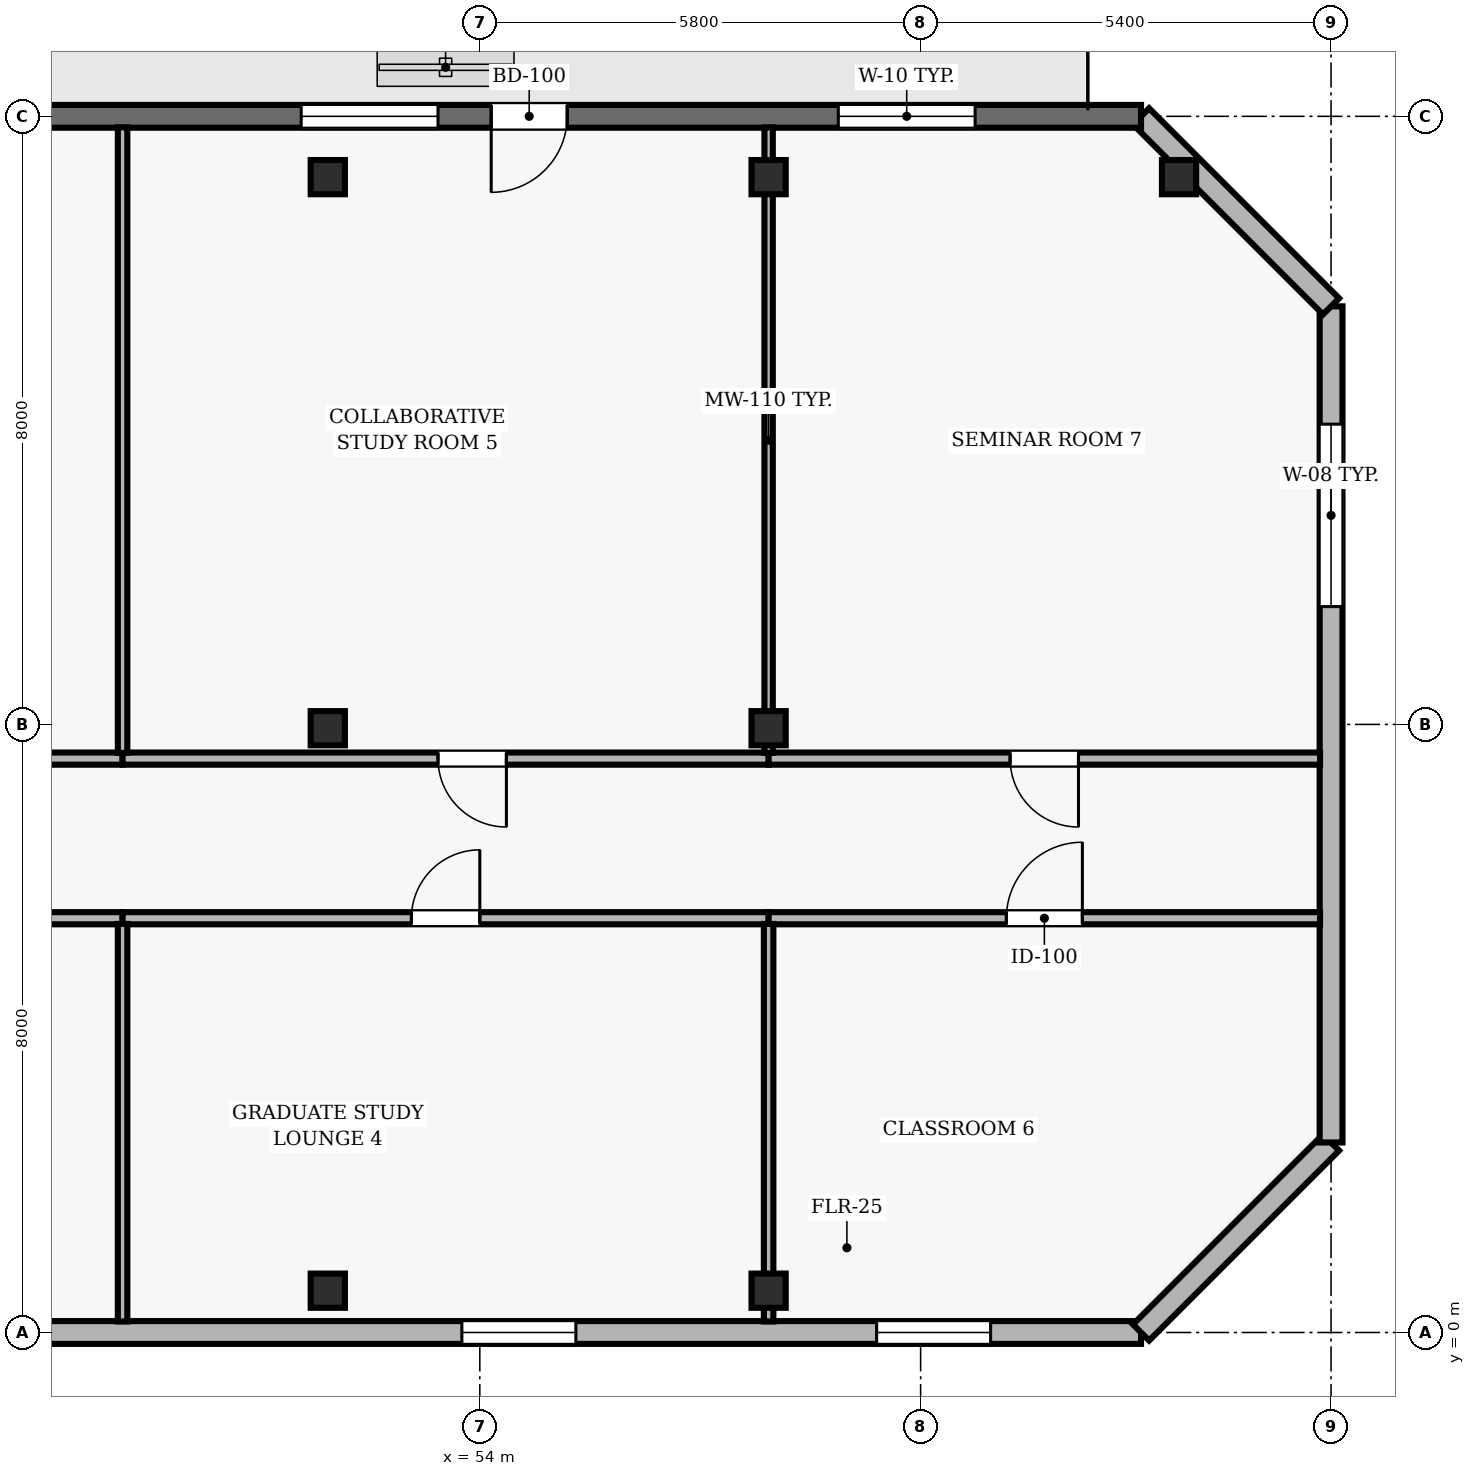
"""IFC4 building model, lengths in metres.
Left out: names, types, materials, properties, quantities, classifications, styles, units other than length and angle.
Written with IfcOpenShell. Run it as: python <this file> out.ifc"""

import sys

from ifc_helpers import new_model, si_unit, direction, frame, frame_2d, origin, origin_2d, place, context, subcontext, project, spatial, rectangle, hollow_rectangle, extrude, element, fill, save


model = new_model("IFC4")
c1 = context("Model", 3, precision=1e-05, world=origin(), true_north=direction((0.0, 1.0)))
c2 = subcontext(c1, "Body", "Model", "MODEL_VIEW")
j1 = project(units=[si_unit("LENGTHUNIT", "METRE"), si_unit("PLANEANGLEUNIT", "RADIAN")], contexts=[c1])
p1 = place(None, origin())
s1 = spatial("IfcSite", under=j1, at=p1, CompositionType="ELEMENT")
p2 = place(p1, origin())
s2 = spatial("IfcBuilding", under=s1, at=p2, CompositionType="ELEMENT")
p3 = place(p2, frame((0.0, 0.0, 218.7)))
s3 = spatial("IfcBuildingStorey", under=s2, at=p3, CompositionType="ELEMENT", Elevation=218.7)
for number, where, z_axis, x_axis in (
    (1, (52.0, 0.55, 0.0), (0.0, 0.0, 1.0), (1.0, 0.0, 0.0)),
    (2, (52.0, 7.95, 0.0), (0.0, 0.0, 1.0), (1.0, 0.0, 0.0)),
    (3, (52.0, 15.2, 0.0), (0.0, 0.0, 1.0), (1.0, 0.0, 0.0)),
    (4, (57.8, 0.55, 0.0), (0.0, 0.0, 1.0), (1.0, 0.0, 0.0)),
    (5, (57.8, 7.95, 0.0), (0.0, 0.0, 1.0), (1.0, 0.0, 0.0)),
    (6, (57.8, 15.2, 0.0), (0.0, 0.0, 1.0), (1.0, 0.0, 0.0)),
    (7, (63.2, 15.2, 0.0), (0.0, 0.0, 1.0), (1.0, 0.0, 0.0)),
):
    element("IfcColumn", number, at=place(p3, frame(where, z_axis=z_axis, x_axis=x_axis)), inside=s3, PredefinedType="COLUMN", context=c2, shape_type="SweptSolid", body=[
        extrude(hollow_rectangle(XDim=0.45, YDim=0.45, WallThickness=0.02, at=origin_2d()), origin(), (0.0, 0.0, 1.0), 3.9),
    ])
p4 = place(p3, frame((24.5, 0.0, 0.0), z_axis=(0.0, 0.0, 1.0), x_axis=(1.0, 0.0, 0.0)))
e8 = element("IfcWall", 8, at=p4, inside=s3, PredefinedType="SOLIDWALL", context=c2, shape_type="SweptSolid", body=[
    extrude(rectangle(XDim=38.2, YDim=0.3, at=frame_2d((19.1, 0.0))), origin(), (0.0, 0.0, 1.0), 3.69),
])
p5 = place(p4, frame((1.979, 0.0, 0.9)))
e9 = element("IfcOpeningElement", 9, at=p5, cuts=e8, PredefinedType="OPENING", context=c2, shape_type="SweptSolid", body=[
    extrude(rectangle(XDim=1.5, YDim=1.8, at=frame_2d((0.75, 0.9))), frame((0.0, 0.16, 0.0), z_axis=(0.0, -1.0, 0.0), x_axis=(1.0, 0.0, 0.0)), (0.0, 0.0, 1.0), 0.32),
])
p6 = place(p4, frame((8.336, 0.0, 0.9)))
e10 = element("IfcOpeningElement", 10, at=p6, cuts=e8, PredefinedType="OPENING", context=c2, shape_type="SweptSolid", body=[
    extrude(rectangle(XDim=1.5, YDim=1.8, at=frame_2d((0.75, 0.9))), frame((0.0, 0.16, 0.0), z_axis=(0.0, -1.0, 0.0), x_axis=(1.0, 0.0, 0.0)), (0.0, 0.0, 1.0), 0.32),
])
p7 = place(p4, frame((18.35, 0.0, 0.9)))
e11 = element("IfcOpeningElement", 11, at=p7, cuts=e8, PredefinedType="OPENING", context=c2, shape_type="SweptSolid", body=[
    extrude(rectangle(XDim=1.5, YDim=1.8, at=frame_2d((0.75, 0.9))), frame((0.0, 0.16, 0.0), z_axis=(0.0, -1.0, 0.0), x_axis=(1.0, 0.0, 0.0)), (0.0, 0.0, 1.0), 0.32),
])
p8 = place(p4, frame((29.264, 0.0, 0.9)))
e12 = element("IfcOpeningElement", 12, at=p8, cuts=e8, PredefinedType="OPENING", context=c2, shape_type="SweptSolid", body=[
    extrude(rectangle(XDim=1.5, YDim=1.8, at=frame_2d((0.75, 0.9))), frame((0.0, 0.16, 0.0), z_axis=(0.0, -1.0, 0.0), x_axis=(1.0, 0.0, 0.0)), (0.0, 0.0, 1.0), 0.32),
])
p9 = place(p4, frame((34.721, 0.0, 0.9)))
e13 = element("IfcOpeningElement", 13, at=p9, cuts=e8, PredefinedType="OPENING", context=c2, shape_type="SweptSolid", body=[
    extrude(rectangle(XDim=1.5, YDim=1.8, at=frame_2d((0.75, 0.9))), frame((0.0, 0.16, 0.0), z_axis=(0.0, -1.0, 0.0), x_axis=(1.0, 0.0, 0.0)), (0.0, 0.0, 1.0), 0.32),
])
p10 = place(p3, frame((62.7, 0.0, 0.0), z_axis=(0.0, 0.0, 1.0), x_axis=(0.707106781187, 0.707106781187, 0.0)))
e14 = element("IfcWall", 14, at=p10, inside=s3, PredefinedType="SOLIDWALL", context=c2, shape_type="SweptSolid", body=[
    extrude(rectangle(XDim=3.536, YDim=0.3, at=frame_2d((1.768, 0.0))), origin(), (0.0, 0.0, 1.0), 3.69),
])
p11 = place(p3, frame((65.2, 2.5, 0.0), z_axis=(0.0, 0.0, 1.0), x_axis=(0.0, 1.0, 0.0)))
e15 = element("IfcWall", 15, at=p11, inside=s3, PredefinedType="SOLIDWALL", context=c2, shape_type="SweptSolid", body=[
    extrude(rectangle(XDim=11.0, YDim=0.3, at=frame_2d((5.5, 0.0))), origin(), (0.0, 0.0, 1.0), 3.69),
])
p12 = place(p11, frame((7.05, 0.0, 0.9)))
e16 = element("IfcOpeningElement", 16, at=p12, cuts=e15, PredefinedType="OPENING", context=c2, shape_type="SweptSolid", body=[
    extrude(rectangle(XDim=2.4, YDim=1.8, at=frame_2d((1.2, 0.9))), frame((0.0, 0.16, 0.0), z_axis=(0.0, -1.0, 0.0), x_axis=(1.0, 0.0, 0.0)), (0.0, 0.0, 1.0), 0.32),
])
p13 = place(p3, frame((65.2, 13.5, 0.0), z_axis=(0.0, 0.0, 1.0), x_axis=(-0.707106781187, 0.707106781187, 0.0)))
e17 = element("IfcWall", 17, at=p13, inside=s3, PredefinedType="SOLIDWALL", context=c2, shape_type="SweptSolid", body=[
    extrude(rectangle(XDim=3.536, YDim=0.3, at=frame_2d((1.768, 0.0))), origin(), (0.0, 0.0, 1.0), 3.69),
])
p14 = place(p3, frame((62.7, 16.0, 0.0), z_axis=(0.0, 0.0, 1.0), x_axis=(-1.0, 0.0, 0.0)))
e18 = element("IfcWall", 18, at=p14, inside=s3, PredefinedType="SOLIDWALL", context=c2, shape_type="SweptSolid", body=[
    extrude(rectangle(XDim=18.5, YDim=0.3, at=frame_2d((9.25, 0.0))), origin(), (0.0, 0.0, 1.0), 3.69),
])
p15 = place(p14, frame((7.55, 0.0, 0.0)))
e19 = element("IfcOpeningElement", 19, at=p15, cuts=e18, PredefinedType="OPENING", context=c2, shape_type="SweptSolid", body=[
    extrude(rectangle(XDim=1.0, YDim=2.2, at=frame_2d((0.5, 1.1))), frame((0.0, 0.16, 0.0), z_axis=(0.0, -1.0, 0.0), x_axis=(1.0, 0.0, 0.0)), (0.0, 0.0, 1.0), 0.32),
])
p16 = place(p14, frame((2.183, 0.0, 0.9)))
e20 = element("IfcOpeningElement", 20, at=p16, cuts=e18, PredefinedType="OPENING", context=c2, shape_type="SweptSolid", body=[
    extrude(rectangle(XDim=1.8, YDim=2.2, at=frame_2d((0.9, 1.1))), frame((0.0, 0.16, 0.0), z_axis=(0.0, -1.0, 0.0), x_axis=(1.0, 0.0, 0.0)), (0.0, 0.0, 1.0), 0.32),
])
p17 = place(p14, frame((9.25, 0.0, 0.9)))
e21 = element("IfcOpeningElement", 21, at=p17, cuts=e18, PredefinedType="OPENING", context=c2, shape_type="SweptSolid", body=[
    extrude(rectangle(XDim=1.8, YDim=2.2, at=frame_2d((0.9, 1.1))), frame((0.0, 0.16, 0.0), z_axis=(0.0, -1.0, 0.0), x_axis=(1.0, 0.0, 0.0)), (0.0, 0.0, 1.0), 0.32),
])
p18 = place(p14, frame((14.517, 0.0, 0.9)))
e22 = element("IfcOpeningElement", 22, at=p18, cuts=e18, PredefinedType="OPENING", context=c2, shape_type="SweptSolid", body=[
    extrude(rectangle(XDim=1.8, YDim=2.2, at=frame_2d((0.9, 1.1))), frame((0.0, 0.16, 0.0), z_axis=(0.0, -1.0, 0.0), x_axis=(1.0, 0.0, 0.0)), (0.0, 0.0, 1.0), 0.32),
])
p19 = place(p3, frame((40.35, 5.45, 0.0), z_axis=(0.0, 0.0, 1.0), x_axis=(1.0, 0.0, 0.0)))
e23 = element("IfcWall", 23, at=p19, inside=s3, PredefinedType="PARTITIONING", context=c2, shape_type="SweptSolid", body=[
    extrude(rectangle(XDim=8.95, YDim=0.16, at=frame_2d((4.475, 0.0))), origin(), (0.0, 0.0, 1.0), 3.372),
])
p20 = place(p19, frame((4.025, 0.0, 0.0)))
e24 = element("IfcOpeningElement", 24, at=p20, cuts=e23, PredefinedType="OPENING", context=c2, shape_type="SweptSolid", body=[
    extrude(rectangle(XDim=0.9, YDim=2.1, at=frame_2d((0.45, 1.05))), frame((0.0, 0.09, 0.0), z_axis=(0.0, -1.0, 0.0), x_axis=(1.0, 0.0, 0.0)), (0.0, 0.0, 1.0), 0.18),
])
p21 = place(p3, frame((49.3, 5.45, 0.0), z_axis=(0.0, 0.0, 1.0), x_axis=(1.0, 0.0, 0.0)))
e25 = element("IfcWall", 25, at=p21, inside=s3, PredefinedType="PARTITIONING", context=c2, shape_type="SweptSolid", body=[
    extrude(rectangle(XDim=8.5, YDim=0.16, at=frame_2d((4.25, 0.0))), origin(), (0.0, 0.0, 1.0), 3.372),
])
p22 = place(p21, frame((3.8, 0.0, 0.0)))
e26 = element("IfcOpeningElement", 26, at=p22, cuts=e25, PredefinedType="OPENING", context=c2, shape_type="SweptSolid", body=[
    extrude(rectangle(XDim=0.9, YDim=2.1, at=frame_2d((0.45, 1.05))), frame((0.0, 0.09, 0.0), z_axis=(0.0, -1.0, 0.0), x_axis=(1.0, 0.0, 0.0)), (0.0, 0.0, 1.0), 0.18),
])
p23 = place(p3, frame((49.3, 7.55, 0.0), z_axis=(0.0, 0.0, 1.0), x_axis=(-1.0, 0.0, 0.0)))
e27 = element("IfcWall", 27, at=p23, inside=s3, PredefinedType="PARTITIONING", context=c2, shape_type="SweptSolid", body=[
    extrude(rectangle(XDim=8.95, YDim=0.16, at=frame_2d((4.475, 0.0))), origin(), (0.0, 0.0, 1.0), 3.146),
])
p24 = place(p23, frame((5.075, 0.0, 0.0)))
e28 = element("IfcOpeningElement", 28, at=p24, cuts=e27, PredefinedType="OPENING", context=c2, shape_type="SweptSolid", body=[
    extrude(rectangle(XDim=0.9, YDim=2.1, at=frame_2d((0.45, 1.05))), frame((0.0, 0.09, 0.0), z_axis=(0.0, -1.0, 0.0), x_axis=(1.0, 0.0, 0.0)), (0.0, 0.0, 1.0), 0.18),
])
p25 = place(p3, frame((57.8, 5.45, 0.0), z_axis=(0.0, 0.0, 1.0), x_axis=(1.0, 0.0, 0.0)))
e29 = element("IfcWall", 29, at=p25, inside=s3, PredefinedType="PARTITIONING", context=c2, shape_type="SweptSolid", body=[
    extrude(rectangle(XDim=7.255, YDim=0.16, at=frame_2d((3.627, 0.0))), origin(), (0.0, 0.0, 1.0), 3.69),
])
p26 = place(p25, frame((3.128, 0.0, 0.0)))
e30 = element("IfcOpeningElement", 30, at=p26, cuts=e29, PredefinedType="OPENING", context=c2, shape_type="SweptSolid", body=[
    extrude(rectangle(XDim=1.0, YDim=2.1, at=frame_2d((0.5, 1.05))), frame((0.0, 0.09, 0.0), z_axis=(0.0, -1.0, 0.0), x_axis=(1.0, 0.0, 0.0)), (0.0, 0.0, 1.0), 0.18),
])
p27 = place(p3, frame((57.8, 7.55, 0.0), z_axis=(0.0, 0.0, 1.0), x_axis=(-1.0, 0.0, 0.0)))
e31 = element("IfcWall", 31, at=p27, inside=s3, PredefinedType="PARTITIONING", context=c2, shape_type="SweptSolid", body=[
    extrude(rectangle(XDim=8.5, YDim=0.16, at=frame_2d((4.25, 0.0))), origin(), (0.0, 0.0, 1.0), 3.146),
])
p28 = place(p27, frame((3.45, 0.0, 0.0)))
e32 = element("IfcOpeningElement", 32, at=p28, cuts=e31, PredefinedType="OPENING", context=c2, shape_type="SweptSolid", body=[
    extrude(rectangle(XDim=0.9, YDim=2.1, at=frame_2d((0.45, 1.05))), frame((0.0, 0.09, 0.0), z_axis=(0.0, -1.0, 0.0), x_axis=(1.0, 0.0, 0.0)), (0.0, 0.0, 1.0), 0.18),
])
p29 = place(p3, frame((65.055, 7.55, 0.0), z_axis=(0.0, 0.0, 1.0), x_axis=(-1.0, 0.0, 0.0)))
e33 = element("IfcWall", 33, at=p29, inside=s3, PredefinedType="PARTITIONING", context=c2, shape_type="SweptSolid", body=[
    extrude(rectangle(XDim=7.255, YDim=0.16, at=frame_2d((3.627, 0.0))), origin(), (0.0, 0.0, 1.0), 3.69),
])
p30 = place(p29, frame((3.178, 0.0, 0.0)))
e34 = element("IfcOpeningElement", 34, at=p30, cuts=e33, PredefinedType="OPENING", context=c2, shape_type="SweptSolid", body=[
    extrude(rectangle(XDim=0.9, YDim=2.1, at=frame_2d((0.45, 1.05))), frame((0.0, 0.09, 0.0), z_axis=(0.0, -1.0, 0.0), x_axis=(1.0, 0.0, 0.0)), (0.0, 0.0, 1.0), 0.18),
])
p31 = place(p3, frame((49.3, 0.145, 0.0), z_axis=(0.0, 0.0, 1.0), x_axis=(0.0, 1.0, 0.0)))
e35 = element("IfcWall", 35, at=p31, inside=s3, PredefinedType="PARTITIONING", context=c2, shape_type="SweptSolid", body=[
    extrude(rectangle(XDim=5.23, YDim=0.125, at=frame_2d((2.615, 0.0))), origin(), (0.0, 0.0, 1.0), 3.69),
])
p32 = place(p3, frame((49.3, 7.625, 0.0), z_axis=(0.0, 0.0, 1.0), x_axis=(0.0, 1.0, 0.0)))
e36 = element("IfcWall", 36, at=p32, inside=s3, PredefinedType="PARTITIONING", context=c2, shape_type="SweptSolid", body=[
    extrude(rectangle(XDim=8.23, YDim=0.125, at=frame_2d((4.115, 0.0))), origin(), (0.0, 0.0, 1.0), 3.69),
])
p33 = place(p3, frame((57.8, 0.145, 0.0), z_axis=(0.0, 0.0, 1.0), x_axis=(0.0, 1.0, 0.0)))
e37 = element("IfcWall", 37, at=p33, inside=s3, PredefinedType="PARTITIONING", context=c2, shape_type="SweptSolid", body=[
    extrude(rectangle(XDim=5.23, YDim=0.125, at=frame_2d((2.615, 0.0))), origin(), (0.0, 0.0, 1.0), 3.146),
])
p34 = place(p3, frame((57.8, 7.625, 0.0), z_axis=(0.0, 0.0, 1.0), x_axis=(0.0, 1.0, 0.0)))
e38 = element("IfcWall", 38, at=p34, inside=s3, PredefinedType="MOVABLE", context=c2, shape_type="SweptSolid", body=[
    extrude(rectangle(XDim=8.23, YDim=0.11, at=frame_2d((4.115, 0.0))), origin(), (0.0, 0.0, 1.0), 3.146),
])
p35 = place(p8, origin())
e39 = element("IfcWindow", 39, at=p35, inside=s3, PartitioningType="SINGLE_PANEL", PredefinedType="WINDOW", context=c2, shape_type="SweptSolid", body=[
    extrude(rectangle(XDim=1.5, YDim=1.8, at=frame_2d((0.75, 0.9))), frame((0.0, 0.03, 0.0), z_axis=(0.0, -1.0, 0.0), x_axis=(1.0, 0.0, 0.0)), (0.0, 0.0, 1.0), 0.06),
])
fill(e12, e39)
p36 = place(p9, origin())
e40 = element("IfcWindow", 40, at=p36, inside=s3, PartitioningType="SINGLE_PANEL", PredefinedType="WINDOW", context=c2, shape_type="SweptSolid", body=[
    extrude(rectangle(XDim=1.5, YDim=1.8, at=frame_2d((0.75, 0.9))), frame((0.0, 0.03, 0.0), z_axis=(0.0, -1.0, 0.0), x_axis=(1.0, 0.0, 0.0)), (0.0, 0.0, 1.0), 0.06),
])
fill(e13, e40)
p37 = place(p12, origin())
e41 = element("IfcWindow", 41, at=p37, inside=s3, PartitioningType="SINGLE_PANEL", PredefinedType="WINDOW", context=c2, shape_type="SweptSolid", body=[
    extrude(rectangle(XDim=2.4, YDim=1.8, at=frame_2d((1.2, 0.9))), frame((0.0, 0.03, 0.0), z_axis=(0.0, -1.0, 0.0), x_axis=(1.0, 0.0, 0.0)), (0.0, 0.0, 1.0), 0.06),
])
fill(e16, e41)
p38 = place(p15, origin())
e42 = element("IfcDoor", 42, at=p38, inside=s3, OperationType="SINGLE_SWING_RIGHT", PredefinedType="DOOR", context=c2, shape_type="SweptSolid", body=[
    extrude(rectangle(XDim=1.0, YDim=2.2, at=frame_2d((0.5, 1.1))), frame((0.0, 0.025, 0.0), z_axis=(0.0, -1.0, 0.0), x_axis=(1.0, 0.0, 0.0)), (0.0, 0.0, 1.0), 0.05),
])
fill(e19, e42)
p39 = place(p16, origin())
e43 = element("IfcWindow", 43, at=p39, inside=s3, PartitioningType="SINGLE_PANEL", PredefinedType="WINDOW", context=c2, shape_type="SweptSolid", body=[
    extrude(rectangle(XDim=1.8, YDim=2.2, at=frame_2d((0.9, 1.1))), frame((0.0, 0.03, 0.0), z_axis=(0.0, -1.0, 0.0), x_axis=(1.0, 0.0, 0.0)), (0.0, 0.0, 1.0), 0.06),
])
fill(e20, e43)
p40 = place(p17, origin())
e44 = element("IfcWindow", 44, at=p40, inside=s3, PartitioningType="SINGLE_PANEL", PredefinedType="WINDOW", context=c2, shape_type="SweptSolid", body=[
    extrude(rectangle(XDim=1.8, YDim=2.2, at=frame_2d((0.9, 1.1))), frame((0.0, 0.03, 0.0), z_axis=(0.0, -1.0, 0.0), x_axis=(1.0, 0.0, 0.0)), (0.0, 0.0, 1.0), 0.06),
])
fill(e21, e44)
p41 = place(p22, origin())
e45 = element("IfcDoor", 45, at=p41, inside=s3, OperationType="SINGLE_SWING_RIGHT", PredefinedType="DOOR", context=c2, shape_type="SweptSolid", body=[
    extrude(rectangle(XDim=0.9, YDim=2.1, at=frame_2d((0.45, 1.05))), frame((0.0, 0.025, 0.0), z_axis=(0.0, -1.0, 0.0), x_axis=(1.0, 0.0, 0.0)), (0.0, 0.0, 1.0), 0.05),
])
fill(e26, e45)
p42 = place(p28, origin())
e46 = element("IfcDoor", 46, at=p42, inside=s3, OperationType="SINGLE_SWING_LEFT", PredefinedType="DOOR", context=c2, shape_type="SweptSolid", body=[
    extrude(rectangle(XDim=0.9, YDim=2.1, at=frame_2d((0.45, 1.05))), frame((0.0, 0.025, 0.0), z_axis=(0.0, -1.0, 0.0), x_axis=(1.0, 0.0, 0.0)), (0.0, 0.0, 1.0), 0.05),
])
fill(e32, e46)
p43 = place(p26, origin())
e47 = element("IfcDoor", 47, at=p43, inside=s3, OperationType="SINGLE_SWING_RIGHT", PredefinedType="DOOR", context=c2, shape_type="SweptSolid", body=[
    extrude(rectangle(XDim=1.0, YDim=2.1, at=frame_2d((0.5, 1.05))), frame((0.0, 0.025, 0.0), z_axis=(0.0, -1.0, 0.0), x_axis=(1.0, 0.0, 0.0)), (0.0, 0.0, 1.0), 0.05),
])
fill(e30, e47)
p44 = place(p30, origin())
e48 = element("IfcDoor", 48, at=p44, inside=s3, OperationType="SINGLE_SWING_LEFT", PredefinedType="DOOR", context=c2, shape_type="SweptSolid", body=[
    extrude(rectangle(XDim=0.9, YDim=2.1, at=frame_2d((0.45, 1.05))), frame((0.0, 0.025, 0.0), z_axis=(0.0, -1.0, 0.0), x_axis=(1.0, 0.0, 0.0)), (0.0, 0.0, 1.0), 0.05),
])
fill(e34, e48)
save(model, sys.argv[1])
